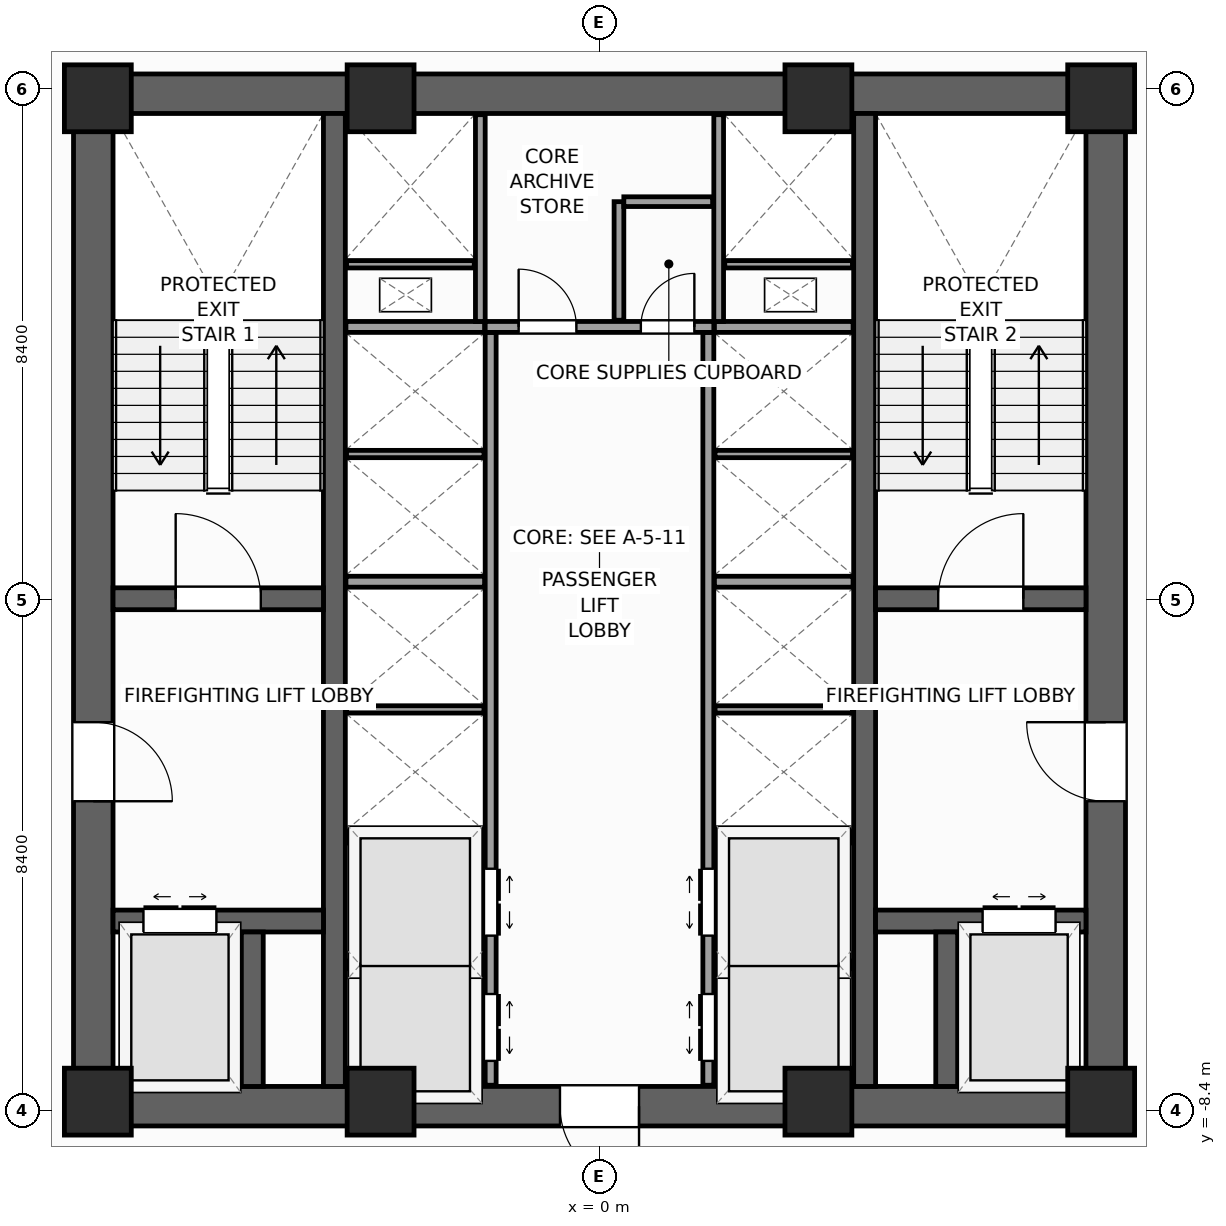
"""IFC4 building model, lengths in metres.
Left out: names, types, materials, properties, quantities, classifications, styles, units other than length and angle.
Written with IfcOpenShell. Run it as: python <this file> out.ifc"""

import sys

from ifc_helpers import new_model, si_unit, direction, frame, frame_2d, origin, origin_2d, place, context, subcontext, project, spatial, rectangle, extrude, source, transform, mapped, element, fill, save


model = new_model("IFC4")
c1 = context("Model", 3, precision=1e-05, world=origin(), true_north=direction((0.0, 1.0)))
c2 = subcontext(c1, "Body", "Model", "MODEL_VIEW")
j1 = project(units=[si_unit("LENGTHUNIT", "METRE"), si_unit("PLANEANGLEUNIT", "RADIAN")], contexts=[c1])
p1 = place(None, origin())
s1 = spatial("IfcSite", under=j1, at=p1, CompositionType="ELEMENT")
p2 = place(p1, origin())
s2 = spatial("IfcBuilding", under=s1, at=p2, CompositionType="ELEMENT")
p3 = place(p2, frame((0.0, 0.0, 107.2)))
s3 = spatial("IfcBuildingStorey", under=s2, at=p3, CompositionType="ELEMENT", Elevation=107.2)
p4 = place(p3, frame((-8.65, -8.325, 0.0), z_axis=(0.0, 0.0, 1.0), x_axis=(1.0, 0.0, 0.0)))
e1 = element("IfcWall", 1, at=p4, inside=s3, PredefinedType="SHEAR", context=c2, shape_type="SweptSolid", body=[
    extrude(rectangle(XDim=17.3, YDim=0.65, at=frame_2d((8.65, 0.0))), origin(), (0.0, 0.0, 1.0), 4.0),
])
p5 = place(p4, frame((8.0, 0.0, 0.0)))
e2 = element("IfcOpeningElement", 2, at=p5, cuts=e1, PredefinedType="OPENING", context=c2, shape_type="SweptSolid", body=[
    extrude(rectangle(XDim=1.3, YDim=2.2, at=frame_2d((0.65, 1.1))), frame((0.0, 0.335, 0.0), z_axis=(0.0, -1.0, 0.0), x_axis=(1.0, 0.0, 0.0)), (0.0, 0.0, 1.0), 0.67),
])
p6 = place(p3, frame((-8.65, 8.325, 0.0), z_axis=(0.0, 0.0, 1.0), x_axis=(1.0, 0.0, 0.0)))
e3 = element("IfcWall", 3, at=p6, inside=s3, PredefinedType="SHEAR", context=c2, shape_type="SweptSolid", body=[
    extrude(rectangle(XDim=17.3, YDim=0.65, at=frame_2d((8.65, 0.0))), origin(), (0.0, 0.0, 1.0), 4.0),
])
p7 = place(p3, frame((-8.325, -8.0, 0.0), z_axis=(0.0, 0.0, 1.0), x_axis=(0.0, 1.0, 0.0)))
e4 = element("IfcWall", 4, at=p7, inside=s3, PredefinedType="SHEAR", context=c2, shape_type="SweptSolid", body=[
    extrude(rectangle(XDim=16.0, YDim=0.65, at=frame_2d((8.0, 0.0))), origin(), (0.0, 0.0, 1.0), 4.0),
])
p8 = place(p7, frame((4.69, 0.0, 0.0)))
e5 = element("IfcOpeningElement", 5, at=p8, cuts=e4, PredefinedType="OPENING", context=c2, shape_type="SweptSolid", body=[
    extrude(rectangle(XDim=1.3, YDim=2.2, at=frame_2d((0.65, 1.1))), frame((0.0, 0.335, 0.0), z_axis=(0.0, -1.0, 0.0), x_axis=(1.0, 0.0, 0.0)), (0.0, 0.0, 1.0), 0.67),
])
p9 = place(p3, frame((8.325, -8.0, 0.0), z_axis=(0.0, 0.0, 1.0), x_axis=(0.0, 1.0, 0.0)))
e6 = element("IfcWall", 6, at=p9, inside=s3, PredefinedType="SHEAR", context=c2, shape_type="SweptSolid", body=[
    extrude(rectangle(XDim=16.0, YDim=0.65, at=frame_2d((8.0, 0.0))), origin(), (0.0, 0.0, 1.0), 4.0),
])
p10 = place(p9, frame((4.69, 0.0, 0.0)))
e7 = element("IfcOpeningElement", 7, at=p10, cuts=e6, PredefinedType="OPENING", context=c2, shape_type="SweptSolid", body=[
    extrude(rectangle(XDim=1.3, YDim=2.2, at=frame_2d((0.65, 1.1))), frame((0.0, 0.335, 0.0), z_axis=(0.0, -1.0, 0.0), x_axis=(1.0, 0.0, 0.0)), (0.0, 0.0, 1.0), 0.67),
])
for number, where, z_axis, x_axis in (
    (8, (-4.36, -8.0, 0.0), (0.0, 0.0, 1.0), (0.0, 1.0, 0.0)),
    (9, (4.36, -8.0, 0.0), (0.0, 0.0, 1.0), (0.0, 1.0, 0.0)),
):
    element("IfcWall", number, at=place(p3, frame(where, z_axis=z_axis, x_axis=x_axis)), inside=s3, PredefinedType="SHEAR", context=c2, shape_type="SweptSolid", body=[
        extrude(rectangle(XDim=16.0, YDim=0.36, at=frame_2d((8.0, 0.0))), origin(), (0.0, 0.0, 1.0), 4.0),
    ])
p11 = place(p3, frame((-8.0, 0.02, 0.0), z_axis=(0.0, 0.0, 1.0), x_axis=(1.0, 0.0, 0.0)))
e10 = element("IfcWall", 10, at=p11, inside=s3, PredefinedType="SHEAR", context=c2, shape_type="SweptSolid", body=[
    extrude(rectangle(XDim=3.46, YDim=0.36, at=frame_2d((1.73, 0.0))), origin(), (0.0, 0.0, 1.0), 4.0),
])
p12 = place(p11, frame((1.03, 0.0, 0.0)))
e11 = element("IfcOpeningElement", 11, at=p12, cuts=e10, PredefinedType="OPENING", context=c2, shape_type="SweptSolid", body=[
    extrude(rectangle(XDim=1.4, YDim=2.2, at=frame_2d((0.7, 1.1))), frame((0.0, 0.19, 0.0), z_axis=(0.0, -1.0, 0.0), x_axis=(1.0, 0.0, 0.0)), (0.0, 0.0, 1.0), 0.38),
])
p13 = place(p3, frame((4.54, 0.02, 0.0), z_axis=(0.0, 0.0, 1.0), x_axis=(1.0, 0.0, 0.0)))
e12 = element("IfcWall", 12, at=p13, inside=s3, PredefinedType="SHEAR", context=c2, shape_type="SweptSolid", body=[
    extrude(rectangle(XDim=3.46, YDim=0.36, at=frame_2d((1.73, 0.0))), origin(), (0.0, 0.0, 1.0), 4.0),
])
p14 = place(p13, frame((1.03, 0.0, 0.0)))
e13 = element("IfcOpeningElement", 13, at=p14, cuts=e12, PredefinedType="OPENING", context=c2, shape_type="SweptSolid", body=[
    extrude(rectangle(XDim=1.4, YDim=2.2, at=frame_2d((0.7, 1.1))), frame((0.0, 0.19, 0.0), z_axis=(0.0, -1.0, 0.0), x_axis=(1.0, 0.0, 0.0)), (0.0, 0.0, 1.0), 0.38),
])
p15 = place(p3, frame((-8.0, -5.28, 0.0), z_axis=(0.0, 0.0, 1.0), x_axis=(1.0, 0.0, 0.0)))
e14 = element("IfcWall", 14, at=p15, inside=s3, PredefinedType="SHEAR", context=c2, shape_type="SweptSolid", body=[
    extrude(rectangle(XDim=3.46, YDim=0.36, at=frame_2d((1.73, 0.0))), origin(), (0.0, 0.0, 1.0), 4.0),
])
p16 = place(p15, frame((0.5, 0.0, 0.0)))
e15 = element("IfcOpeningElement", 15, at=p16, cuts=e14, PredefinedType="OPENING", context=c2, shape_type="SweptSolid", body=[
    extrude(rectangle(XDim=1.2, YDim=2.25, at=frame_2d((0.6, 1.125))), frame((0.0, 0.19, 0.0), z_axis=(0.0, -1.0, 0.0), x_axis=(1.0, 0.0, 0.0)), (0.0, 0.0, 1.0), 0.38),
])
p17 = place(p3, frame((4.54, -5.28, 0.0), z_axis=(0.0, 0.0, 1.0), x_axis=(1.0, 0.0, 0.0)))
e16 = element("IfcWall", 16, at=p17, inside=s3, PredefinedType="SHEAR", context=c2, shape_type="SweptSolid", body=[
    extrude(rectangle(XDim=3.46, YDim=0.36, at=frame_2d((1.73, 0.0))), origin(), (0.0, 0.0, 1.0), 4.0),
])
p18 = place(p17, frame((1.76, 0.0, 0.0)))
e17 = element("IfcOpeningElement", 17, at=p18, cuts=e16, PredefinedType="OPENING", context=c2, shape_type="SweptSolid", body=[
    extrude(rectangle(XDim=1.2, YDim=2.25, at=frame_2d((0.6, 1.125))), frame((0.0, 0.19, 0.0), z_axis=(0.0, -1.0, 0.0), x_axis=(1.0, 0.0, 0.0)), (0.0, 0.0, 1.0), 0.38),
])
for number, where, z_axis, x_axis in (
    (18, (-5.71, -8.0, 0.0), (0.0, 0.0, 1.0), (0.0, 1.0, 0.0)),
    (19, (5.71, -8.0, 0.0), (0.0, 0.0, 1.0), (0.0, 1.0, 0.0)),
):
    element("IfcWall", number, at=place(p3, frame(where, z_axis=z_axis, x_axis=x_axis)), inside=s3, PredefinedType="SHEAR", context=c2, shape_type="SweptSolid", body=[
        extrude(rectangle(XDim=2.54, YDim=0.36, at=frame_2d((1.27, 0.0))), origin(), (0.0, 0.0, 1.0), 4.0),
    ])
m1 = source(origin(), c2, "Body", "SweptSolid", [
    extrude(rectangle(XDim=1.1, YDim=1.1, at=origin_2d()), origin(), (0.0, 0.0, 1.0), 4.0),
])
for number, where, z_axis, x_axis in (
    (20, (-8.25, -8.25, 0.0), (0.0, 0.0, 1.0), (1.0, 0.0, 0.0)),
    (21, (8.25, -8.25, 0.0), (0.0, 0.0, 1.0), (1.0, 0.0, 0.0)),
    (22, (8.25, 8.25, 0.0), (0.0, 0.0, 1.0), (1.0, 0.0, 0.0)),
    (23, (-8.25, 8.25, 0.0), (0.0, 0.0, 1.0), (1.0, 0.0, 0.0)),
    (24, (-3.6, -8.25, 0.0), (0.0, 0.0, 1.0), (1.0, 0.0, 0.0)),
    (25, (3.6, -8.25, 0.0), (0.0, 0.0, 1.0), (1.0, 0.0, 0.0)),
    (26, (-3.6, 8.25, 0.0), (0.0, 0.0, 1.0), (1.0, 0.0, 0.0)),
    (27, (3.6, 8.25, 0.0), (0.0, 0.0, 1.0), (1.0, 0.0, 0.0)),
):
    element("IfcColumn", number, at=place(p3, frame(where, z_axis=z_axis, x_axis=x_axis)), inside=s3, PredefinedType="PILASTER", context=c2, shape_type="MappedRepresentation", body=[
        mapped(m1, transform((0.0, 0.0, 0.0), scale=1.0)),
    ])
p19 = place(p3, frame((-1.79, -7.98, 0.0), z_axis=(0.0, 0.0, 1.0), x_axis=(0.0, 1.0, 0.0)))
e28 = element("IfcWall", 28, at=p19, inside=s3, PredefinedType="PARTITIONING", context=c2, shape_type="SweptSolid", body=[
    extrude(rectangle(XDim=12.38, YDim=0.18, at=frame_2d((6.19, 0.0))), origin(), (0.0, 0.0, 1.0), 3.74),
])
p20 = place(p19, frame((0.4, 0.0, 0.0)))
e29 = element("IfcOpeningElement", 29, at=p20, cuts=e28, PredefinedType="OPENING", context=c2, shape_type="SweptSolid", body=[
    extrude(rectangle(XDim=1.1, YDim=2.2, at=frame_2d((0.55, 1.1))), frame((0.0, 0.1, 0.0), z_axis=(0.0, -1.0, 0.0), x_axis=(1.0, 0.0, 0.0)), (0.0, 0.0, 1.0), 0.2),
])
p21 = place(p19, frame((2.46, 0.0, 0.0)))
e30 = element("IfcOpeningElement", 30, at=p21, cuts=e28, PredefinedType="OPENING", context=c2, shape_type="SweptSolid", body=[
    extrude(rectangle(XDim=1.1, YDim=2.2, at=frame_2d((0.55, 1.1))), frame((0.0, 0.1, 0.0), z_axis=(0.0, -1.0, 0.0), x_axis=(1.0, 0.0, 0.0)), (0.0, 0.0, 1.0), 0.2),
])
p22 = place(p3, frame((1.79, -7.98, 0.0), z_axis=(0.0, 0.0, 1.0), x_axis=(0.0, 1.0, 0.0)))
e31 = element("IfcWall", 31, at=p22, inside=s3, PredefinedType="PARTITIONING", context=c2, shape_type="SweptSolid", body=[
    extrude(rectangle(XDim=12.38, YDim=0.18, at=frame_2d((6.19, 0.0))), origin(), (0.0, 0.0, 1.0), 3.74),
])
p23 = place(p22, frame((0.4, 0.0, 0.0)))
e32 = element("IfcOpeningElement", 32, at=p23, cuts=e31, PredefinedType="OPENING", context=c2, shape_type="SweptSolid", body=[
    extrude(rectangle(XDim=1.1, YDim=2.2, at=frame_2d((0.55, 1.1))), frame((0.0, 0.1, 0.0), z_axis=(0.0, -1.0, 0.0), x_axis=(1.0, 0.0, 0.0)), (0.0, 0.0, 1.0), 0.2),
])
p24 = place(p22, frame((2.46, 0.0, 0.0)))
e33 = element("IfcOpeningElement", 33, at=p24, cuts=e31, PredefinedType="OPENING", context=c2, shape_type="SweptSolid", body=[
    extrude(rectangle(XDim=1.1, YDim=2.2, at=frame_2d((0.55, 1.1))), frame((0.0, 0.1, 0.0), z_axis=(0.0, -1.0, 0.0), x_axis=(1.0, 0.0, 0.0)), (0.0, 0.0, 1.0), 0.2),
])
p25 = place(p3, frame((-1.88, 4.49, 0.0), z_axis=(0.0, 0.0, 1.0), x_axis=(1.0, 0.0, 0.0)))
e34 = element("IfcWall", 34, at=p25, inside=s3, PredefinedType="PARTITIONING", context=c2, shape_type="SweptSolid", body=[
    extrude(rectangle(XDim=3.76, YDim=0.18, at=frame_2d((1.88, 0.0))), origin(), (0.0, 0.0, 1.0), 3.74),
])
p26 = place(p25, frame((0.55, 0.0, 0.0)))
e35 = element("IfcOpeningElement", 35, at=p26, cuts=e34, PredefinedType="OPENING", context=c2, shape_type="SweptSolid", body=[
    extrude(rectangle(XDim=0.95, YDim=2.1, at=frame_2d((0.475, 1.05))), frame((0.0, 0.1, 0.0), z_axis=(0.0, -1.0, 0.0), x_axis=(1.0, 0.0, 0.0)), (0.0, 0.0, 1.0), 0.2),
])
p27 = place(p25, frame((2.56, 0.0, 0.0)))
e36 = element("IfcOpeningElement", 36, at=p27, cuts=e34, PredefinedType="OPENING", context=c2, shape_type="SweptSolid", body=[
    extrude(rectangle(XDim=0.88, YDim=2.1, at=frame_2d((0.44, 1.05))), frame((0.0, 0.1, 0.0), z_axis=(0.0, -1.0, 0.0), x_axis=(1.0, 0.0, 0.0)), (0.0, 0.0, 1.0), 0.2),
])
for number, where, z_axis, x_axis in (
    (37, (-4.17, -3.9, 0.0), (0.0, 0.0, 1.0), (1.0, 0.0, 0.0)),
    (38, (1.89, -3.9, 0.0), (0.0, 0.0, 1.0), (1.0, 0.0, 0.0)),
    (39, (-4.17, 0.3, 0.0), (0.0, 0.0, 1.0), (1.0, 0.0, 0.0)),
    (40, (1.89, 0.3, 0.0), (0.0, 0.0, 1.0), (1.0, 0.0, 0.0)),
    (41, (-4.17, 4.49, 0.0), (0.0, 0.0, 1.0), (1.0, 0.0, 0.0)),
    (42, (1.89, 4.49, 0.0), (0.0, 0.0, 1.0), (1.0, 0.0, 0.0)),
):
    element("IfcWall", number, at=place(p3, frame(where, z_axis=z_axis, x_axis=x_axis)), inside=s3, PredefinedType="PARTITIONING", context=c2, shape_type="SweptSolid", body=[
        extrude(rectangle(XDim=2.28, YDim=0.18, at=frame_2d((1.14, 0.0))), origin(), (0.0, 0.0, 1.0), 3.74),
    ])
for number, where, z_axis, x_axis in (
    (43, (-4.16, -6.0, 0.0), (0.0, 0.0, 1.0), (1.0, 0.0, 0.0)),
    (44, (1.9, -6.0, 0.0), (0.0, 0.0, 1.0), (1.0, 0.0, 0.0)),
    (45, (-4.16, -1.8, 0.0), (0.0, 0.0, 1.0), (1.0, 0.0, 0.0)),
    (46, (1.9, -1.8, 0.0), (0.0, 0.0, 1.0), (1.0, 0.0, 0.0)),
    (47, (-4.16, 2.4, 0.0), (0.0, 0.0, 1.0), (1.0, 0.0, 0.0)),
    (48, (1.9, 2.4, 0.0), (0.0, 0.0, 1.0), (1.0, 0.0, 0.0)),
):
    element("IfcWall", number, at=place(p3, frame(where, z_axis=z_axis, x_axis=x_axis)), inside=s3, PredefinedType="PARTITIONING", context=c2, shape_type="SweptSolid", body=[
        extrude(rectangle(XDim=2.26, YDim=0.12, at=frame_2d((1.13, 0.0))), origin(), (0.0, 0.0, 1.0), 3.74),
    ])
for number, where, z_axis, x_axis in (
    (49, (-1.96, 4.58, 0.0), (0.0, 0.0, 1.0), (0.0, 1.0, 0.0)),
    (50, (1.96, 4.58, 0.0), (0.0, 0.0, 1.0), (0.0, 1.0, 0.0)),
):
    element("IfcWall", number, at=place(p3, frame(where, z_axis=z_axis, x_axis=x_axis)), inside=s3, PredefinedType="PARTITIONING", context=c2, shape_type="SweptSolid", body=[
        extrude(rectangle(XDim=3.4, YDim=0.16, at=frame_2d((1.7, 0.0))), origin(), (0.0, 0.0, 1.0), 3.74),
    ])
for number, where, z_axis, x_axis in (
    (51, (-4.16, 5.52, 0.0), (0.0, 0.0, 1.0), (1.0, 0.0, 0.0)),
    (52, (2.06, 5.52, 0.0), (0.0, 0.0, 1.0), (1.0, 0.0, 0.0)),
):
    element("IfcWall", number, at=place(p3, frame(where, z_axis=z_axis, x_axis=x_axis)), inside=s3, PredefinedType="PARTITIONING", context=c2, shape_type="SweptSolid", body=[
        extrude(rectangle(XDim=2.1, YDim=0.12, at=frame_2d((1.05, 0.0))), origin(), (0.0, 0.0, 1.0), 3.74),
    ])
p28 = place(p3, frame((0.32, 4.6, 0.0), z_axis=(0.0, 0.0, 1.0), x_axis=(0.0, 1.0, 0.0)))
e53 = element("IfcWall", 53, at=p28, inside=s3, PredefinedType="PARTITIONING", context=c2, shape_type="SweptSolid", body=[
    extrude(rectangle(XDim=1.95, YDim=0.16, at=frame_2d((0.975, 0.0))), origin(), (0.0, 0.0, 1.0), 3.74),
])
p29 = place(p3, frame((0.4, 6.55, 0.0), z_axis=(0.0, 0.0, 1.0), x_axis=(1.0, 0.0, 0.0)))
e54 = element("IfcWall", 54, at=p29, inside=s3, PredefinedType="PARTITIONING", context=c2, shape_type="SweptSolid", body=[
    extrude(rectangle(XDim=1.46, YDim=0.16, at=frame_2d((0.73, 0.0))), origin(), (0.0, 0.0, 1.0), 3.74),
])
m2 = source(origin(), c2, "Body", "SweptSolid", [
    extrude(rectangle(XDim=1.4, YDim=2.2, at=frame_2d((0.7, 1.1))), frame((0.0, 0.025, 0.0), z_axis=(0.0, -1.0, 0.0), x_axis=(1.0, 0.0, 0.0)), (0.0, 0.0, 1.0), 0.05),
])
p30 = place(p12, origin())
e55 = element("IfcDoor", 55, at=p30, inside=s3, OperationType="SINGLE_SWING_LEFT", PredefinedType="DOOR", context=c2, shape_type="MappedRepresentation", body=[
    mapped(m2, transform((0.0, 0.0, 0.0), scale=1.0)),
])
fill(e11, e55)
p31 = place(p14, origin())
e56 = element("IfcDoor", 56, at=p31, inside=s3, OperationType="SINGLE_SWING_RIGHT", PredefinedType="DOOR", context=c2, shape_type="MappedRepresentation", body=[
    mapped(m2, transform((0.0, 0.0, 0.0), scale=1.0)),
])
fill(e13, e56)
m3 = source(origin(), c2, "Body", "SweptSolid", [
    extrude(rectangle(XDim=1.3, YDim=2.2, at=frame_2d((0.65, 1.1))), frame((0.0, 0.025, 0.0), z_axis=(0.0, -1.0, 0.0), x_axis=(1.0, 0.0, 0.0)), (0.0, 0.0, 1.0), 0.05),
])
p32 = place(p8, frame((1.3, 0.0, 0.0), z_axis=(0.0, 0.0, 1.0), x_axis=(-1.0, 0.0, 0.0)))
e57 = element("IfcDoor", 57, at=p32, inside=s3, OperationType="SINGLE_SWING_LEFT", PredefinedType="DOOR", context=c2, shape_type="MappedRepresentation", body=[
    mapped(m3, transform((0.0, 0.0, 0.0), scale=1.0)),
])
fill(e5, e57)
p33 = place(p10, origin())
e58 = element("IfcDoor", 58, at=p33, inside=s3, OperationType="SINGLE_SWING_RIGHT", PredefinedType="DOOR", context=c2, shape_type="MappedRepresentation", body=[
    mapped(m3, transform((0.0, 0.0, 0.0), scale=1.0)),
])
fill(e7, e58)
p34 = place(p5, frame((1.3, 0.0, 0.0), z_axis=(0.0, 0.0, 1.0), x_axis=(-1.0, 0.0, 0.0)))
e59 = element("IfcDoor", 59, at=p34, inside=s3, OperationType="SINGLE_SWING_RIGHT", PredefinedType="DOOR", context=c2, shape_type="MappedRepresentation", body=[
    mapped(m3, transform((0.0, 0.0, 0.0), scale=1.0)),
])
fill(e2, e59)
m4 = source(origin(), c2, "Body", "SweptSolid", [
    extrude(rectangle(XDim=1.2, YDim=2.25, at=frame_2d((0.6, 1.125))), frame((0.0, 0.025, 0.0), z_axis=(0.0, -1.0, 0.0), x_axis=(1.0, 0.0, 0.0)), (0.0, 0.0, 1.0), 0.05),
])
p35 = place(p16, origin())
e60 = element("IfcDoor", 60, at=p35, inside=s3, OperationType="DOUBLE_DOOR_SLIDING", PredefinedType="DOOR", context=c2, shape_type="MappedRepresentation", body=[
    mapped(m4, transform((0.0, 0.0, 0.0), scale=1.0)),
])
fill(e15, e60)
p36 = place(p18, origin())
e61 = element("IfcDoor", 61, at=p36, inside=s3, OperationType="DOUBLE_DOOR_SLIDING", PredefinedType="DOOR", context=c2, shape_type="MappedRepresentation", body=[
    mapped(m4, transform((0.0, 0.0, 0.0), scale=1.0)),
])
fill(e17, e61)
m5 = source(origin(), c2, "Body", "SweptSolid", [
    extrude(rectangle(XDim=1.1, YDim=2.2, at=frame_2d((0.55, 1.1))), frame((0.0, 0.025, 0.0), z_axis=(0.0, -1.0, 0.0), x_axis=(1.0, 0.0, 0.0)), (0.0, 0.0, 1.0), 0.05),
])
p37 = place(p20, frame((1.1, 0.0, 0.0), z_axis=(0.0, 0.0, 1.0), x_axis=(-1.0, 0.0, 0.0)))
e62 = element("IfcDoor", 62, at=p37, inside=s3, OperationType="DOUBLE_DOOR_SLIDING", PredefinedType="DOOR", context=c2, shape_type="MappedRepresentation", body=[
    mapped(m5, transform((0.0, 0.0, 0.0), scale=1.0)),
])
fill(e29, e62)
p38 = place(p21, frame((1.1, 0.0, 0.0), z_axis=(0.0, 0.0, 1.0), x_axis=(-1.0, 0.0, 0.0)))
e63 = element("IfcDoor", 63, at=p38, inside=s3, OperationType="DOUBLE_DOOR_SLIDING", PredefinedType="DOOR", context=c2, shape_type="MappedRepresentation", body=[
    mapped(m5, transform((0.0, 0.0, 0.0), scale=1.0)),
])
fill(e30, e63)
p39 = place(p23, origin())
e64 = element("IfcDoor", 64, at=p39, inside=s3, OperationType="DOUBLE_DOOR_SLIDING", PredefinedType="DOOR", context=c2, shape_type="MappedRepresentation", body=[
    mapped(m5, transform((0.0, 0.0, 0.0), scale=1.0)),
])
fill(e32, e64)
p40 = place(p24, origin())
e65 = element("IfcDoor", 65, at=p40, inside=s3, OperationType="DOUBLE_DOOR_SLIDING", PredefinedType="DOOR", context=c2, shape_type="MappedRepresentation", body=[
    mapped(m5, transform((0.0, 0.0, 0.0), scale=1.0)),
])
fill(e33, e65)
m6 = source(origin(), c2, "Body", "SweptSolid", [
    extrude(rectangle(XDim=0.95, YDim=2.1, at=frame_2d((0.475, 1.05))), frame((0.0, 0.025, 0.0), z_axis=(0.0, -1.0, 0.0), x_axis=(1.0, 0.0, 0.0)), (0.0, 0.0, 1.0), 0.05),
])
p41 = place(p26, origin())
e66 = element("IfcDoor", 66, at=p41, inside=s3, OperationType="SINGLE_SWING_LEFT", PredefinedType="DOOR", context=c2, shape_type="MappedRepresentation", body=[
    mapped(m6, transform((0.0, 0.0, 0.0), scale=1.0)),
])
fill(e35, e66)
m7 = source(origin(), c2, "Body", "SweptSolid", [
    extrude(rectangle(XDim=0.88, YDim=2.1, at=frame_2d((0.44, 1.05))), frame((0.0, 0.025, 0.0), z_axis=(0.0, -1.0, 0.0), x_axis=(1.0, 0.0, 0.0)), (0.0, 0.0, 1.0), 0.05),
])
p42 = place(p27, origin())
e67 = element("IfcDoor", 67, at=p42, inside=s3, OperationType="SINGLE_SWING_RIGHT", PredefinedType="DOOR", context=c2, shape_type="MappedRepresentation", body=[
    mapped(m7, transform((0.0, 0.0, 0.0), scale=1.0)),
])
fill(e36, e67)
save(model, sys.argv[1])
